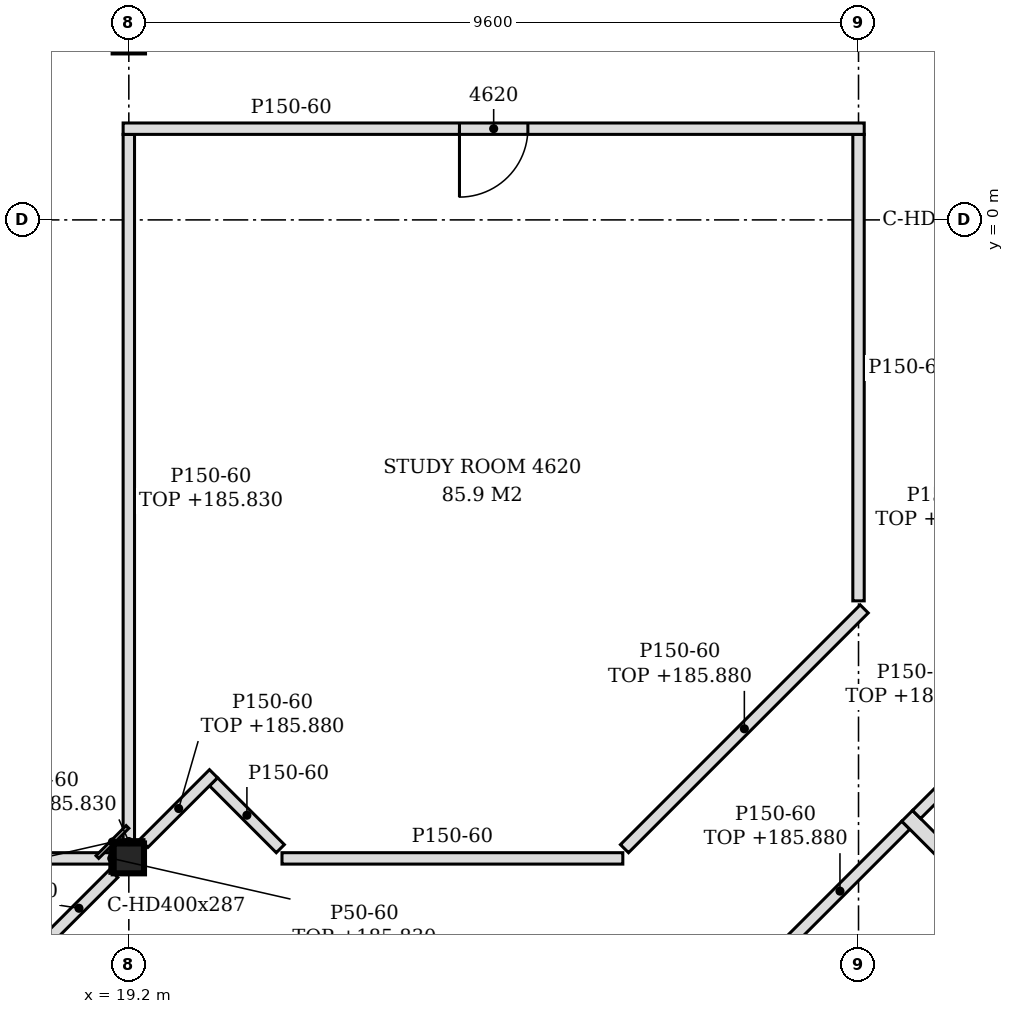
"""IFC4 building model, lengths in metres.
Left out: names, types, materials, properties, quantities, classifications, styles, units other than length and angle.
Written with IfcOpenShell. Run it as: python <this file> out.ifc"""

import sys

from ifc_helpers import new_model, si_unit, direction, frame, frame_2d, origin, origin_2d, place, context, subcontext, project, spatial, polyline, rectangle, i_section, outline, extrude, element, fill, save


model = new_model("IFC4")
c1 = context("Model", 3, precision=1e-05, world=origin(), true_north=direction((0.0, 1.0)))
c2 = subcontext(c1, "Body", "Model", "MODEL_VIEW")
j1 = project(units=[si_unit("LENGTHUNIT", "METRE"), si_unit("PLANEANGLEUNIT", "RADIAN")], contexts=[c1])
p1 = place(None, origin())
s1 = spatial("IfcSite", under=j1, at=p1, CompositionType="ELEMENT")
p2 = place(p1, origin())
s2 = spatial("IfcBuilding", under=s1, at=p2, CompositionType="ELEMENT")
p3 = place(p2, frame((0.0, 0.0, 183.0)))
s3 = spatial("IfcBuildingStorey", under=s2, at=p3, CompositionType="ELEMENT", Elevation=183.0)
p4 = place(p3, frame((19.2, -8.4, -0.15), z_axis=(0.0, 0.0, 1.0), x_axis=(1.0, 0.0, 0.0)))
e1 = element("IfcColumn", 1, at=p4, inside=s3, PredefinedType="COLUMN", context=c2, shape_type="SweptSolid", body=[
    extrude(i_section(OverallWidth=0.399, OverallDepth=0.393, WebThickness=0.023, FlangeThickness=0.037, FilletRadius=0.015, at=origin_2d()), origin(), (0.0, 0.0, 1.0), 3.6),
])
p5 = place(p3, frame((25.321, -12.066, 0.0), z_axis=(0.0, 0.0, 1.0), x_axis=(0.707001564794, 0.707211981926, 0.0)))
e2 = element("IfcWall", 2, at=p5, inside=s3, PredefinedType="PARTITIONING", context=c2, shape_type="SweptSolid", body=[
    extrude(rectangle(XDim=5.801, YDim=0.15, at=frame_2d((2.901, 0.0))), origin(), (0.0, 0.0, 1.0), 2.88),
])
p6 = place(p5, frame((2.45, 0.0, 0.0)))
e3 = element("IfcOpeningElement", 3, at=p6, cuts=e2, PredefinedType="OPENING", context=c2, shape_type="SweptSolid", body=[
    extrude(rectangle(XDim=0.9, YDim=2.1, at=frame_2d((0.45, 1.05))), frame((0.0, 0.085, 0.0), z_axis=(0.0, -1.0, 0.0), x_axis=(1.0, 0.0, 0.0)), (0.0, 0.0, 1.0), 0.17),
])
p7 = place(p3, frame((31.975, -10.375, 0.0), z_axis=(0.0, 0.0, 1.0), x_axis=(-0.707140836465, 0.707072724268, 0.0)))
e4 = element("IfcWall", 4, at=p7, inside=s3, PredefinedType="PARTITIONING", context=c2, shape_type="SweptSolid", body=[
    extrude(rectangle(XDim=3.584, YDim=0.2, at=frame_2d((1.792, 0.0))), origin(), (0.0, 0.0, 1.0), 2.73),
])
p8 = place(p3, frame((18.086, -9.514, 0.0), z_axis=(0.0, 0.0, 1.0), x_axis=(0.707106781187, 0.707106781187, 0.0)))
e5 = element("IfcWall", 5, at=p8, inside=s3, PredefinedType="PARTITIONING", context=c2, shape_type="SweptSolid", body=[
    extrude(rectangle(XDim=1.295, YDim=0.15, at=frame_2d((0.648, 0.0))), origin(), (0.0, 0.0, 1.0), 3.45),
])
p9 = place(p3, frame((7.399, -8.4, 0.0), z_axis=(0.0, 0.0, 1.0), x_axis=(1.0, 0.0, 0.0)))
e6 = element("IfcWall", 6, at=p9, inside=s3, PredefinedType="PARTITIONING", context=c2, shape_type="SweptSolid", body=[
    extrude(rectangle(XDim=11.601, YDim=0.15, at=frame_2d((5.801, 0.0))), origin(), (0.0, 0.0, 1.0), 2.83),
])
p10 = place(p9, frame((0.551, 0.0, 0.0)))
e7 = element("IfcOpeningElement", 7, at=p10, cuts=e6, PredefinedType="OPENING", context=c2, shape_type="SweptSolid", body=[
    extrude(rectangle(XDim=0.9, YDim=2.1, at=frame_2d((0.45, 1.05))), frame((0.0, 0.085, 0.0), z_axis=(0.0, -1.0, 0.0), x_axis=(1.0, 0.0, 0.0)), (0.0, 0.0, 1.0), 0.17),
])
p11 = place(p3, frame((21.215, -8.4, 0.0), z_axis=(0.0, 0.0, 1.0), x_axis=(1.0, 0.0, 0.0)))
e8 = element("IfcWall", 8, at=p11, inside=s3, PredefinedType="PARTITIONING", context=c2, shape_type="SweptSolid", body=[
    extrude(rectangle(XDim=4.484, YDim=0.15, at=frame_2d((2.242, 0.0))), origin(), (0.0, 0.0, 1.0), 3.45),
])
p12 = place(p3, frame((21.193, -8.272, 0.0), z_axis=(0.0, 0.0, 1.0), x_axis=(-0.706812296552, 0.70740114323, 0.0)))
e9 = element("IfcWall", 9, at=p12, inside=s3, PredefinedType="PARTITIONING", context=c2, shape_type="SweptSolid", body=[
    extrude(rectangle(XDim=1.244, YDim=0.15, at=frame_2d((0.622, 0.0))), origin(), (0.0, 0.0, 1.0), 3.45),
])
p13 = place(p3, frame((25.721, -8.272, 0.0), z_axis=(0.0, 0.0, 1.0), x_axis=(0.707106781187, 0.707106781187, 0.0)))
e10 = element("IfcWall", 10, at=p13, inside=s3, PredefinedType="PARTITIONING", context=c2, shape_type="SweptSolid", body=[
    extrude(rectangle(XDim=4.46, YDim=0.15, at=frame_2d((2.23, 0.0))), origin(), (0.0, 0.0, 1.0), 2.88),
])
p14 = place(p3, frame((19.2, -8.204, 0.0), z_axis=(0.0, 0.0, 1.0), x_axis=(0.0, 1.0, 0.0)))
e11 = element("IfcWall", 11, at=p14, inside=s3, PredefinedType="PARTITIONING", context=c2, shape_type="SweptSolid", body=[
    extrude(rectangle(XDim=9.329, YDim=0.15, at=frame_2d((4.664, 0.0))), origin(), (0.0, 0.0, 1.0), 2.83),
])
p15 = place(p3, frame((19.398, -8.202, 0.0), z_axis=(0.0, 0.0, 1.0), x_axis=(0.707200993001, 0.707012556818, 0.0)))
e12 = element("IfcWall", 12, at=p15, inside=s3, PredefinedType="PARTITIONING", context=c2, shape_type="SweptSolid", body=[
    extrude(rectangle(XDim=1.296, YDim=0.15, at=frame_2d((0.648, 0.0))), origin(), (0.0, 0.0, 1.0), 2.88),
])
p16 = place(p3, frame((29.564, -7.822, 0.0), z_axis=(0.0, 0.0, 1.0), x_axis=(0.707308581055, 0.706904923711, 0.0)))
e13 = element("IfcWall", 13, at=p16, inside=s3, PredefinedType="PARTITIONING", context=c2, shape_type="SweptSolid", body=[
    extrude(rectangle(XDim=2.419, YDim=0.15, at=frame_2d((1.209, 0.0))), origin(), (0.0, 0.0, 1.0), 2.73),
])
p17 = place(p3, frame((28.8, -5.012, 0.0), z_axis=(0.0, 0.0, 1.0), x_axis=(0.0, 1.0, 0.0)))
e14 = element("IfcWall", 14, at=p17, inside=s3, PredefinedType="PARTITIONING", context=c2, shape_type="SweptSolid", body=[
    extrude(outline(polyline([(0.0, 0.0), (6.137, 0.0), (6.137, 3.45), (2.717, 3.45), (2.715, 2.88), (2.507, 2.88), (2.505, 3.45), (0.0, 3.45), (0.0, 0.0)])), frame((0.0, 0.075, 0.0), z_axis=(0.0, -1.0, 0.0), x_axis=(1.0, 0.0, 0.0)), (0.0, 0.0, 1.0), 0.15),
])
p18 = place(p3, frame((19.125, 1.2, 0.0), z_axis=(0.0, 0.0, 1.0), x_axis=(1.0, 0.0, 0.0)))
e15 = element("IfcWall", 15, at=p18, inside=s3, PredefinedType="PARTITIONING", context=c2, shape_type="SweptSolid", body=[
    extrude(outline(polyline([(0.0, 0.0), (9.75, 0.0), (9.75, 3.45), (0.225, 3.45), (0.223, 2.83), (0.0, 2.83), (0.0, 0.0)])), frame((0.0, 0.075, 0.0), z_axis=(0.0, -1.0, 0.0), x_axis=(1.0, 0.0, 0.0)), (0.0, 0.0, 1.0), 0.15),
])
p19 = place(p18, frame((4.425, 0.0, 0.0)))
e16 = element("IfcOpeningElement", 16, at=p19, cuts=e15, PredefinedType="OPENING", context=c2, shape_type="SweptSolid", body=[
    extrude(rectangle(XDim=0.9, YDim=2.1, at=frame_2d((0.45, 1.05))), frame((0.0, 0.085, 0.0), z_axis=(0.0, -1.0, 0.0), x_axis=(1.0, 0.0, 0.0)), (0.0, 0.0, 1.0), 0.17),
])
p20 = place(p3, frame((18.786, -8.382, 0.0), z_axis=(0.0, 0.0, 1.0), x_axis=(0.707106781187, 0.707106781187, 0.0)))
e17 = element("IfcWall", 17, at=p20, inside=s3, PredefinedType="PARTITIONING", context=c2, shape_type="SweptSolid", body=[
    extrude(rectangle(XDim=0.56, YDim=0.05, at=frame_2d((0.28, 0.0))), origin(), (0.0, 0.0, 1.0), 2.83),
])
p21 = place(p3, frame((19.0, -8.178, 0.0), z_axis=(0.0, 0.0, 1.0), x_axis=(1.0, 0.0, 0.0)))
e18 = element("IfcWall", 18, at=p21, inside=s3, PredefinedType="PARTITIONING", context=c2, shape_type="SweptSolid", body=[
    extrude(rectangle(XDim=0.399, YDim=0.05, at=frame_2d((0.199, 0.0))), origin(), (0.0, 0.0, 1.0), 2.83),
])
p22 = place(p3, frame((18.976, -8.596, 0.0), z_axis=(0.0, 0.0, 1.0), x_axis=(0.0, 1.0, 0.0)))
e19 = element("IfcWall", 19, at=p22, inside=s3, PredefinedType="PARTITIONING", context=c2, shape_type="SweptSolid", body=[
    extrude(rectangle(XDim=0.393, YDim=0.05, at=frame_2d((0.196, 0.0))), origin(), (0.0, 0.0, 1.0), 2.83),
])
p23 = place(p19, frame((0.9, 0.0, 0.0), z_axis=(0.0, 0.0, 1.0), x_axis=(-1.0, 0.0, 0.0)))
e20 = element("IfcDoor", 20, at=p23, inside=s3, OperationType="SINGLE_SWING_RIGHT", PredefinedType="DOOR", context=c2, shape_type="SweptSolid", body=[
    extrude(rectangle(XDim=0.9, YDim=2.1, at=frame_2d((0.45, 1.05))), frame((0.0, 0.025, 0.0), z_axis=(0.0, -1.0, 0.0), x_axis=(1.0, 0.0, 0.0)), (0.0, 0.0, 1.0), 0.05),
])
fill(e16, e20)
save(model, sys.argv[1])
